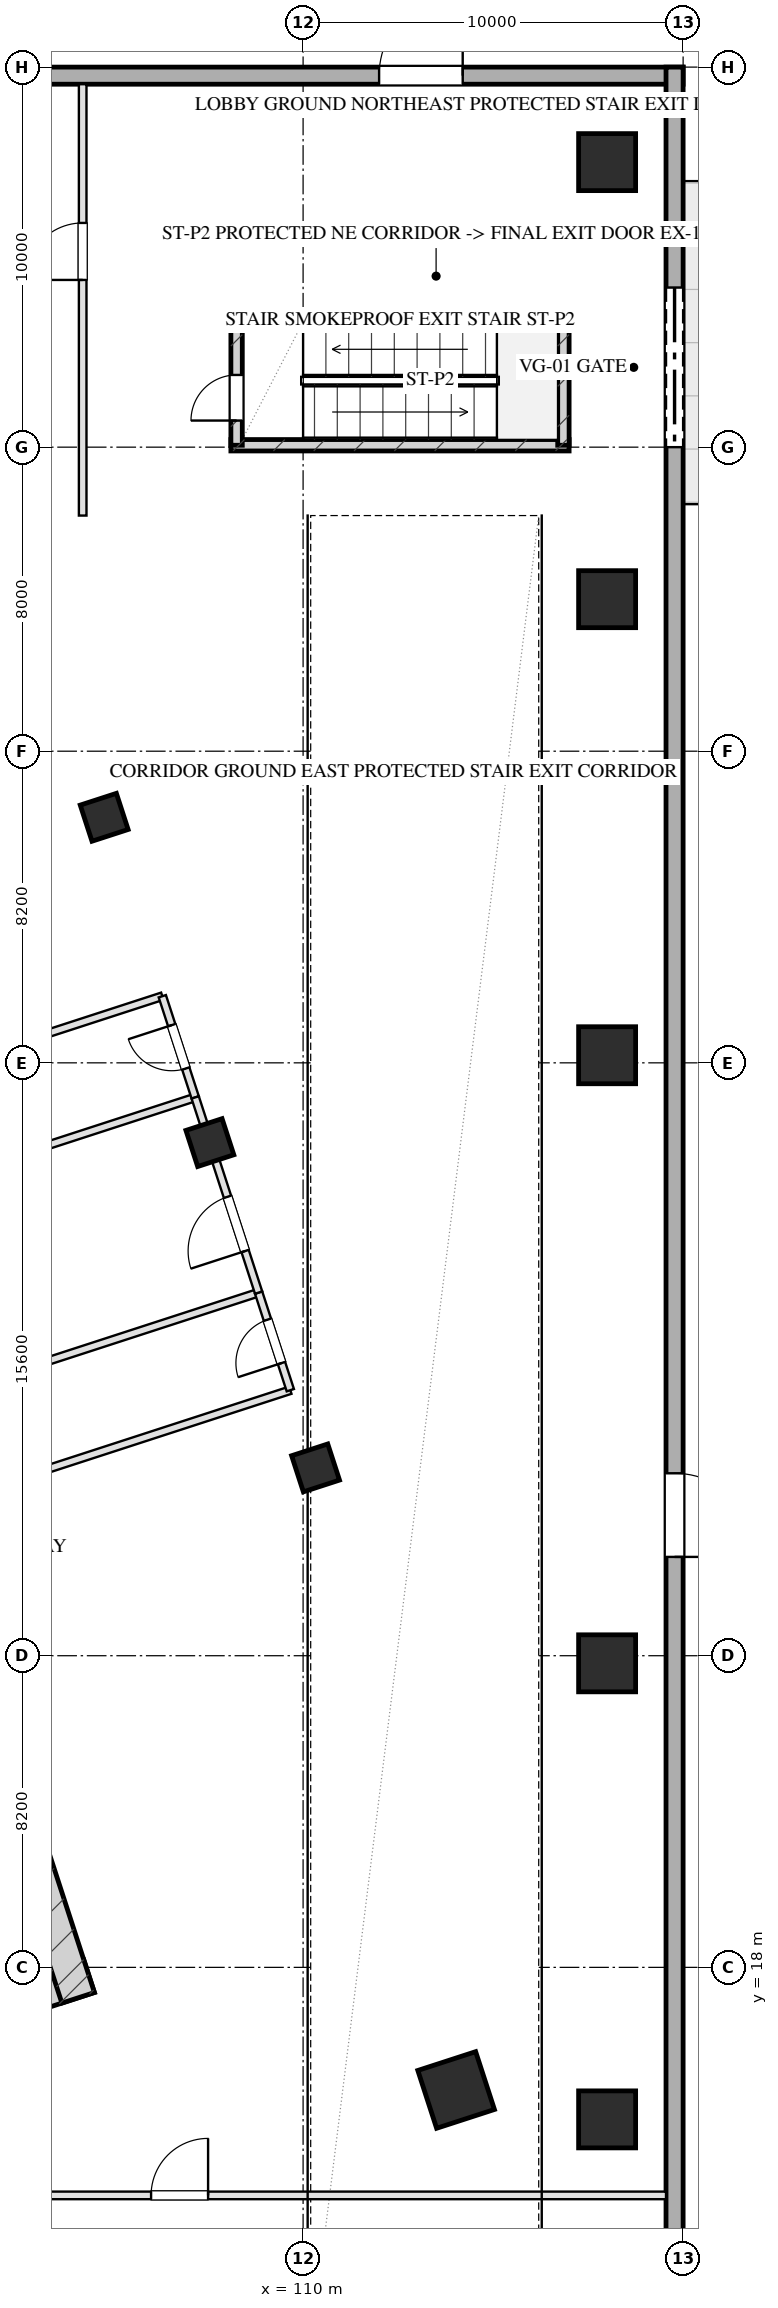
"""IFC4 building model, lengths in metres.
Left out: names, types, materials, properties, quantities, classifications, styles, units other than length and angle.
Written with IfcOpenShell. Run it as: python <this file> out.ifc"""

import sys

from ifc_helpers import new_model, si_unit, direction, frame, frame_2d, origin, origin_2d, place, context, subcontext, project, spatial, rectangle, hollow_rectangle, extrude, element, fill, save


model = new_model("IFC4")
c1 = context("Model", 3, precision=1e-05, world=origin(), true_north=direction((0.0, 1.0)))
c2 = subcontext(c1, "Body", "Model", "MODEL_VIEW")
j1 = project(units=[si_unit("LENGTHUNIT", "METRE"), si_unit("PLANEANGLEUNIT", "RADIAN")], contexts=[c1])
p1 = place(None, origin())
s1 = spatial("IfcSite", under=j1, at=p1, CompositionType="ELEMENT")
p2 = place(p1, origin())
s2 = spatial("IfcBuilding", under=s1, at=p2, CompositionType="ELEMENT")
p3 = place(p2, origin())
s3 = spatial("IfcBuildingStorey", under=s2, at=p3, CompositionType="ELEMENT", Elevation=0.0)
p4 = place(p3, frame((88.487, 12.605, 0.0), z_axis=(0.0, 0.0, 1.0), x_axis=(0.951055016115, 0.309021611416, 0.0)))
e1 = element("IfcWall", 1, at=p4, inside=s3, PredefinedType="SHEAR", context=c2, shape_type="SweptSolid", body=[
    extrude(rectangle(XDim=16.7, YDim=0.9, at=frame_2d((8.35, 0.0))), origin(), (0.0, 0.0, 1.0), 6.0),
])
p5 = place(p3, frame((101.059, 26.5, 0.0), z_axis=(0.0, 0.0, 1.0), x_axis=(0.309021722829, -0.951054979914, 0.0)))
e2 = element("IfcWall", 2, at=p5, inside=s3, PredefinedType="SHEAR", context=c2, shape_type="SweptSolid", body=[
    extrude(rectangle(XDim=9.78, YDim=0.9, at=frame_2d((4.89, 0.0))), origin(), (0.0, 0.0, 1.0), 6.0),
])
for number, where, z_axis, x_axis in (
    (3, (108.1, 58.05, 0.0), (0.0, 0.0, 1.0), (1.0, 0.0, 0.0)),
    (4, (108.1, 61.45, 0.0), (0.0, 0.0, 1.0), (1.0, 0.0, 0.0)),
):
    element("IfcWall", number, at=place(p3, frame(where, z_axis=z_axis, x_axis=x_axis)), inside=s3, PredefinedType="SHEAR", context=c2, shape_type="SweptSolid", body=[
        extrude(rectangle(XDim=8.9, YDim=0.3, at=frame_2d((4.45, 0.0))), origin(), (0.0, 0.0, 1.0), 6.0),
    ])
p6 = place(p3, frame((116.85, 58.05, 0.0), z_axis=(0.0, 0.0, 1.0), x_axis=(0.0, 1.0, 0.0)))
e5 = element("IfcWall", 5, at=p6, inside=s3, PredefinedType="SHEAR", context=c2, shape_type="SweptSolid", body=[
    extrude(rectangle(XDim=3.4, YDim=0.3, at=frame_2d((1.7, 0.0))), origin(), (0.0, 0.0, 1.0), 6.0),
])
p7 = place(p3, frame((108.25, 58.05, 0.0), z_axis=(0.0, 0.0, 1.0), x_axis=(0.0, 1.0, 0.0)))
e6 = element("IfcWall", 6, at=p7, inside=s3, PredefinedType="SHEAR", context=c2, shape_type="SweptSolid", body=[
    extrude(rectangle(XDim=3.4, YDim=0.3, at=frame_2d((1.7, 0.0))), origin(), (0.0, 0.0, 1.0), 6.0),
])
p8 = place(p7, frame((0.65, 0.0, 0.0)))
e7 = element("IfcOpeningElement", 7, at=p8, cuts=e6, PredefinedType="OPENING", context=c2, shape_type="SweptSolid", body=[
    extrude(rectangle(XDim=1.2, YDim=2.05, at=frame_2d((0.6, 1.025))), frame((0.0, 0.16, 0.0), z_axis=(0.0, -1.0, 0.0), x_axis=(1.0, 0.0, 0.0)), (0.0, 0.0, 1.0), 0.32),
])
for number, where, z_axis, x_axis in (
    (8, (118.0, 14.0, 0.0), (0.0, 0.0, 1.0), (1.0, 0.0, 0.0)),
    (9, (118.0, 26.0, 0.0), (0.0, 0.0, 1.0), (1.0, 0.0, 0.0)),
    (10, (118.0, 42.0, 0.0), (0.0, 0.0, 1.0), (1.0, 0.0, 0.0)),
    (11, (118.0, 54.0, 0.0), (0.0, 0.0, 1.0), (1.0, 0.0, 0.0)),
    (12, (118.0, 65.5, 0.0), (0.0, 0.0, 1.0), (1.0, 0.0, 0.0)),
):
    element("IfcColumn", number, at=place(p3, frame(where, z_axis=z_axis, x_axis=x_axis)), inside=s3, PredefinedType="COLUMN", context=c2, shape_type="SweptSolid", body=[
        extrude(rectangle(XDim=1.5, YDim=1.5, at=origin_2d()), origin(), (0.0, 0.0, 1.0), 6.001),
    ])
p9 = place(p3, frame((114.027, 14.774, 0.0), z_axis=(0.0, 0.0, 1.0), x_axis=(0.951056516295, 0.309016994375, 0.0)))
e13 = element("IfcColumn", 13, at=p9, inside=s3, PredefinedType="COLUMN", context=c2, shape_type="SweptSolid", body=[
    extrude(hollow_rectangle(XDim=1.6, YDim=1.6, WallThickness=0.055, at=origin_2d()), origin(), (0.0, 0.0, 1.0), 6.001),
])
for number, where, z_axis, x_axis in (
    (14, (110.328, 31.142, 0.0), (0.0, 0.0, 1.0), (0.951, 0.309, 0.0)),
    (15, (107.547, 39.701, 0.0), (0.0, 0.0, 1.0), (0.951, 0.309, 0.0)),
    (16, (104.766, 48.261, 0.0), (0.0, 0.0, 1.0), (0.951, 0.309, 0.0)),
):
    element("IfcColumn", number, at=place(p3, frame(where, z_axis=z_axis, x_axis=x_axis)), inside=s3, PredefinedType="COLUMN", context=c2, shape_type="SweptSolid", body=[
        extrude(hollow_rectangle(XDim=1.0, YDim=1.0, WallThickness=0.036, at=origin_2d()), origin(), (0.0, 0.0, 1.0), 6.001),
    ])
p10 = place(p3, frame((0.0, 67.775, 0.0), z_axis=(0.0, 0.0, 1.0), x_axis=(1.0, 0.0, 0.0)))
e17 = element("IfcWall", 17, at=p10, inside=s3, PredefinedType="SOLIDWALL", context=c2, shape_type="SweptSolid", body=[
    extrude(rectangle(XDim=120.0, YDim=0.45, at=frame_2d((60.0, 0.0))), origin(), (0.0, 0.0, 1.0), 5.7),
])
p11 = place(p10, frame((14.0, 0.0, 0.0)))
e18 = element("IfcOpeningElement", 18, at=p11, cuts=e17, PredefinedType="OPENING", context=c2, shape_type="SweptSolid", body=[
    extrude(rectangle(XDim=2.2, YDim=2.4, at=frame_2d((1.1, 1.2))), frame((0.0, 0.235, 0.0), z_axis=(0.0, -1.0, 0.0), x_axis=(1.0, 0.0, 0.0)), (0.0, 0.0, 1.0), 0.47),
])
p12 = place(p10, frame((32.0, 0.0, 0.0)))
e19 = element("IfcOpeningElement", 19, at=p12, cuts=e17, PredefinedType="OPENING", context=c2, shape_type="SweptSolid", body=[
    extrude(rectangle(XDim=2.2, YDim=2.4, at=frame_2d((1.1, 1.2))), frame((0.0, 0.235, 0.0), z_axis=(0.0, -1.0, 0.0), x_axis=(1.0, 0.0, 0.0)), (0.0, 0.0, 1.0), 0.47),
])
p13 = place(p10, frame((51.0, 0.0, 0.0)))
e20 = element("IfcOpeningElement", 20, at=p13, cuts=e17, PredefinedType="OPENING", context=c2, shape_type="SweptSolid", body=[
    extrude(rectangle(XDim=2.2, YDim=2.4, at=frame_2d((1.1, 1.2))), frame((0.0, 0.235, 0.0), z_axis=(0.0, -1.0, 0.0), x_axis=(1.0, 0.0, 0.0)), (0.0, 0.0, 1.0), 0.47),
])
p14 = place(p10, frame((59.0, 0.0, 0.0)))
e21 = element("IfcOpeningElement", 21, at=p14, cuts=e17, PredefinedType="OPENING", context=c2, shape_type="SweptSolid", body=[
    extrude(rectangle(XDim=2.2, YDim=2.4, at=frame_2d((1.1, 1.2))), frame((0.0, 0.235, 0.0), z_axis=(0.0, -1.0, 0.0), x_axis=(1.0, 0.0, 0.0)), (0.0, 0.0, 1.0), 0.47),
])
p15 = place(p10, frame((67.0, 0.0, 0.0)))
e22 = element("IfcOpeningElement", 22, at=p15, cuts=e17, PredefinedType="OPENING", context=c2, shape_type="SweptSolid", body=[
    extrude(rectangle(XDim=2.2, YDim=2.4, at=frame_2d((1.1, 1.2))), frame((0.0, 0.235, 0.0), z_axis=(0.0, -1.0, 0.0), x_axis=(1.0, 0.0, 0.0)), (0.0, 0.0, 1.0), 0.47),
])
p16 = place(p10, frame((88.0, 0.0, 0.0)))
e23 = element("IfcOpeningElement", 23, at=p16, cuts=e17, PredefinedType="OPENING", context=c2, shape_type="SweptSolid", body=[
    extrude(rectangle(XDim=2.2, YDim=2.4, at=frame_2d((1.1, 1.2))), frame((0.0, 0.235, 0.0), z_axis=(0.0, -1.0, 0.0), x_axis=(1.0, 0.0, 0.0)), (0.0, 0.0, 1.0), 0.47),
])
p17 = place(p10, frame((112.0, 0.0, 0.0)))
e24 = element("IfcOpeningElement", 24, at=p17, cuts=e17, PredefinedType="OPENING", context=c2, shape_type="SweptSolid", body=[
    extrude(rectangle(XDim=2.2, YDim=2.4, at=frame_2d((1.1, 1.2))), frame((0.0, 0.235, 0.0), z_axis=(0.0, -1.0, 0.0), x_axis=(1.0, 0.0, 0.0)), (0.0, 0.0, 1.0), 0.47),
])
p18 = place(p3, frame((119.775, 68.0, 0.0), z_axis=(0.0, 0.0, 1.0), x_axis=(0.0, -1.0, 0.0)))
e25 = element("IfcWall", 25, at=p18, inside=s3, PredefinedType="SOLIDWALL", context=c2, shape_type="SweptSolid", body=[
    extrude(rectangle(XDim=68.0, YDim=0.45, at=frame_2d((34.0, 0.0))), origin(), (0.0, 0.0, 1.0), 5.7),
])
p19 = place(p18, frame((37.0, 0.0, 0.0)))
e26 = element("IfcOpeningElement", 26, at=p19, cuts=e25, PredefinedType="OPENING", context=c2, shape_type="SweptSolid", body=[
    extrude(rectangle(XDim=2.2, YDim=2.4, at=frame_2d((1.1, 1.2))), frame((0.0, 0.235, 0.0), z_axis=(0.0, -1.0, 0.0), x_axis=(1.0, 0.0, 0.0)), (0.0, 0.0, 1.0), 0.47),
])
p20 = place(p18, frame((5.8, 0.0, 0.0)))
e27 = element("IfcOpeningElement", 27, at=p20, cuts=e25, PredefinedType="OPENING", context=c2, shape_type="SweptSolid", body=[
    extrude(rectangle(XDim=4.2, YDim=2.5, at=frame_2d((2.1, 1.25))), frame((0.0, 0.235, 0.0), z_axis=(0.0, -1.0, 0.0), x_axis=(1.0, 0.0, 0.0)), (0.0, 0.0, 1.0), 0.47),
])
p21 = place(p3, frame((104.2, 56.2, 0.0), z_axis=(0.0, 0.0, 1.0), x_axis=(0.0, 1.0, 0.0)))
e28 = element("IfcWall", 28, at=p21, inside=s3, PredefinedType="PARTITIONING", context=c2, shape_type="SweptSolid", body=[
    extrude(rectangle(XDim=11.35, YDim=0.2, at=frame_2d((5.675, 0.0))), origin(), (0.0, 0.0, 1.0), 5.685),
])
p22 = place(p21, frame((6.2, 0.0, 0.0)))
e29 = element("IfcOpeningElement", 29, at=p22, cuts=e28, PredefinedType="OPENING", context=c2, shape_type="SweptSolid", body=[
    extrude(rectangle(XDim=1.5, YDim=2.05, at=frame_2d((0.75, 1.025))), frame((0.0, 0.11, 0.0), z_axis=(0.0, -1.0, 0.0), x_axis=(1.0, 0.0, 0.0)), (0.0, 0.0, 1.0), 0.22),
])
p23 = place(p3, frame((102.5, 12.0, 0.0), z_axis=(0.0, 0.0, 1.0), x_axis=(1.0, 0.0, 0.0)))
e30 = element("IfcWall", 30, at=p23, inside=s3, PredefinedType="PARTITIONING", context=c2, shape_type="SweptSolid", body=[
    extrude(rectangle(XDim=17.05, YDim=0.2, at=frame_2d((8.525, 0.0))), origin(), (0.0, 0.0, 1.0), 5.685),
])
p24 = place(p23, frame((3.5, 0.0, 0.0)))
e31 = element("IfcOpeningElement", 31, at=p24, cuts=e30, PredefinedType="OPENING", context=c2, shape_type="SweptSolid", body=[
    extrude(rectangle(XDim=1.5, YDim=2.05, at=frame_2d((0.75, 1.025))), frame((0.0, 0.11, 0.0), z_axis=(0.0, -1.0, 0.0), x_axis=(1.0, 0.0, 0.0)), (0.0, 0.0, 1.0), 0.22),
])
p25 = place(p3, frame((87.906, 28.956, 0.0), z_axis=(0.0, 0.0, 1.0), x_axis=(0.951056330024, 0.309017567658, 0.0)))
e32 = element("IfcWall", 32, at=p25, inside=s3, PredefinedType="PARTITIONING", context=c2, shape_type="SweptSolid", body=[
    extrude(rectangle(XDim=22.0, YDim=0.2, at=frame_2d((11.0, 0.0))), origin(), (0.0, 0.0, 1.0), 5.685),
])
p26 = place(p3, frame((99.963, 30.035, 0.0), z_axis=(0.0, 0.0, 1.0), x_axis=(0.951061328589, 0.309002183266, 0.0)))
e33 = element("IfcWall", 33, at=p26, inside=s3, PredefinedType="PARTITIONING", context=c2, shape_type="SweptSolid", body=[
    extrude(rectangle(XDim=10.2, YDim=0.2, at=frame_2d((5.1, 0.0))), origin(), (0.0, 0.0, 1.0), 5.685),
])
p27 = place(p3, frame((109.664, 33.187, 0.0), z_axis=(0.0, 0.0, 1.0), x_axis=(-0.309057448393, 0.951043371037, 0.0)))
e34 = element("IfcWall", 34, at=p27, inside=s3, PredefinedType="PARTITIONING", context=c2, shape_type="SweptSolid", body=[
    extrude(rectangle(XDim=2.7, YDim=0.2, at=frame_2d((1.35, 0.0))), origin(), (0.0, 0.0, 1.0), 5.685),
])
p28 = place(p27, frame((0.75, 0.0, 0.0)))
e35 = element("IfcOpeningElement", 35, at=p28, cuts=e34, PredefinedType="OPENING", context=c2, shape_type="SweptSolid", body=[
    extrude(rectangle(XDim=1.2, YDim=2.05, at=frame_2d((0.6, 1.025))), frame((0.0, 0.11, 0.0), z_axis=(0.0, -1.0, 0.0), x_axis=(1.0, 0.0, 0.0)), (0.0, 0.0, 1.0), 0.22),
])
p29 = place(p3, frame((86.238, 34.092, 0.0), z_axis=(0.0, 0.0, 1.0), x_axis=(0.951056330024, 0.309017567658, 0.0)))
e36 = element("IfcWall", 36, at=p29, inside=s3, PredefinedType="PARTITIONING", context=c2, shape_type="SweptSolid", body=[
    extrude(rectangle(XDim=22.0, YDim=0.2, at=frame_2d((11.0, 0.0))), origin(), (0.0, 0.0, 1.0), 5.685),
])
p30 = place(p3, frame((96.595, 40.401, 0.0), z_axis=(0.0, 0.0, 1.0), x_axis=(0.951052008584, 0.309030867339, 0.0)))
e37 = element("IfcWall", 37, at=p30, inside=s3, PredefinedType="PARTITIONING", context=c2, shape_type="SweptSolid", body=[
    extrude(rectangle(XDim=10.2, YDim=0.2, at=frame_2d((5.1, 0.0))), origin(), (0.0, 0.0, 1.0), 4.675),
])
p31 = place(p3, frame((107.161, 40.89, 0.0), z_axis=(0.0, 0.0, 1.0), x_axis=(-0.308999325213, 0.951062257173, 0.0)))
e38 = element("IfcWall", 38, at=p31, inside=s3, PredefinedType="PARTITIONING", context=c2, shape_type="SweptSolid", body=[
    extrude(rectangle(XDim=2.8, YDim=0.2, at=frame_2d((1.4, 0.0))), origin(), (0.0, 0.0, 1.0), 5.685),
])
p32 = place(p31, frame((0.8, 0.0, 0.0)))
e39 = element("IfcOpeningElement", 39, at=p32, cuts=e38, PredefinedType="OPENING", context=c2, shape_type="SweptSolid", body=[
    extrude(rectangle(XDim=1.2, YDim=2.05, at=frame_2d((0.6, 1.025))), frame((0.0, 0.11, 0.0), z_axis=(0.0, -1.0, 0.0), x_axis=(1.0, 0.0, 0.0)), (0.0, 0.0, 1.0), 0.22),
])
p33 = place(p3, frame((108.829, 35.754, 0.0), z_axis=(0.0, 0.0, 1.0), x_axis=(-0.309016555588, 0.951056658866, 0.0)))
e40 = element("IfcWall", 40, at=p33, inside=s3, PredefinedType="PARTITIONING", context=c2, shape_type="SweptSolid", body=[
    extrude(rectangle(XDim=5.4, YDim=0.2, at=frame_2d((2.7, 0.0))), origin(), (0.0, 0.0, 1.0), 5.685),
])
p34 = place(p33, frame((1.15, 0.0, 0.0)))
e41 = element("IfcOpeningElement", 41, at=p34, cuts=e40, PredefinedType="OPENING", context=c2, shape_type="SweptSolid", body=[
    extrude(rectangle(XDim=1.5, YDim=2.05, at=frame_2d((0.75, 1.025))), frame((0.0, 0.11, 0.0), z_axis=(0.0, -1.0, 0.0), x_axis=(1.0, 0.0, 0.0)), (0.0, 0.0, 1.0), 0.22),
])
p35 = place(p17, origin())
e42 = element("IfcDoor", 42, at=p35, inside=s3, OperationType="SINGLE_SWING_RIGHT", PredefinedType="DOOR", context=c2, shape_type="SweptSolid", body=[
    extrude(rectangle(XDim=2.2, YDim=2.4, at=frame_2d((1.1, 1.2))), frame((0.0, 0.025, 0.0), z_axis=(0.0, -1.0, 0.0), x_axis=(1.0, 0.0, 0.0)), (0.0, 0.0, 1.0), 0.05),
])
fill(e24, e42)
p36 = place(p19, origin())
e43 = element("IfcDoor", 43, at=p36, inside=s3, OperationType="SINGLE_SWING_RIGHT", PredefinedType="DOOR", context=c2, shape_type="SweptSolid", body=[
    extrude(rectangle(XDim=2.2, YDim=2.4, at=frame_2d((1.1, 1.2))), frame((0.0, 0.025, 0.0), z_axis=(0.0, -1.0, 0.0), x_axis=(1.0, 0.0, 0.0)), (0.0, 0.0, 1.0), 0.05),
])
fill(e26, e43)
p37 = place(p20, origin())
e44 = element("IfcDoor", 44, at=p37, inside=s3, OperationType="ROLLINGUP", PredefinedType="GATE", context=c2, shape_type="SweptSolid", body=[
    extrude(rectangle(XDim=4.2, YDim=2.5, at=frame_2d((2.1, 1.25))), frame((0.0, 0.025, 0.0), z_axis=(0.0, -1.0, 0.0), x_axis=(1.0, 0.0, 0.0)), (0.0, 0.0, 1.0), 0.05),
])
fill(e27, e44)
p38 = place(p22, origin())
e45 = element("IfcDoor", 45, at=p38, inside=s3, OperationType="SINGLE_SWING_LEFT", PredefinedType="DOOR", context=c2, shape_type="SweptSolid", body=[
    extrude(rectangle(XDim=1.5, YDim=2.05, at=frame_2d((0.75, 1.025))), frame((0.0, 0.025, 0.0), z_axis=(0.0, -1.0, 0.0), x_axis=(1.0, 0.0, 0.0)), (0.0, 0.0, 1.0), 0.05),
])
fill(e29, e45)
p39 = place(p24, origin())
e46 = element("IfcDoor", 46, at=p39, inside=s3, OperationType="SINGLE_SWING_RIGHT", PredefinedType="DOOR", context=c2, shape_type="SweptSolid", body=[
    extrude(rectangle(XDim=1.5, YDim=2.05, at=frame_2d((0.75, 1.025))), frame((0.0, 0.025, 0.0), z_axis=(0.0, -1.0, 0.0), x_axis=(1.0, 0.0, 0.0)), (0.0, 0.0, 1.0), 0.05),
])
fill(e31, e46)
p40 = place(p28, origin())
e47 = element("IfcDoor", 47, at=p40, inside=s3, OperationType="SINGLE_SWING_LEFT", PredefinedType="DOOR", context=c2, shape_type="SweptSolid", body=[
    extrude(rectangle(XDim=1.2, YDim=2.05, at=frame_2d((0.6, 1.025))), frame((0.0, 0.025, 0.0), z_axis=(0.0, -1.0, 0.0), x_axis=(1.0, 0.0, 0.0)), (0.0, 0.0, 1.0), 0.05),
])
fill(e35, e47)
p41 = place(p32, origin())
e48 = element("IfcDoor", 48, at=p41, inside=s3, OperationType="SINGLE_SWING_RIGHT", PredefinedType="DOOR", context=c2, shape_type="SweptSolid", body=[
    extrude(rectangle(XDim=1.2, YDim=2.05, at=frame_2d((0.6, 1.025))), frame((0.0, 0.025, 0.0), z_axis=(0.0, -1.0, 0.0), x_axis=(1.0, 0.0, 0.0)), (0.0, 0.0, 1.0), 0.05),
])
fill(e39, e48)
p42 = place(p34, origin())
e49 = element("IfcDoor", 49, at=p42, inside=s3, OperationType="SINGLE_SWING_LEFT", PredefinedType="DOOR", context=c2, shape_type="SweptSolid", body=[
    extrude(rectangle(XDim=1.5, YDim=2.05, at=frame_2d((0.75, 1.025))), frame((0.0, 0.025, 0.0), z_axis=(0.0, -1.0, 0.0), x_axis=(1.0, 0.0, 0.0)), (0.0, 0.0, 1.0), 0.05),
])
fill(e41, e49)
p43 = place(p8, origin())
e50 = element("IfcDoor", 50, at=p43, inside=s3, OperationType="SINGLE_SWING_LEFT", PredefinedType="DOOR", context=c2, shape_type="SweptSolid", body=[
    extrude(rectangle(XDim=1.2, YDim=2.05, at=frame_2d((0.6, 1.025))), frame((0.0, 0.025, 0.0), z_axis=(0.0, -1.0, 0.0), x_axis=(1.0, 0.0, 0.0)), (0.0, 0.0, 1.0), 0.05),
])
fill(e7, e50)
save(model, sys.argv[1])
